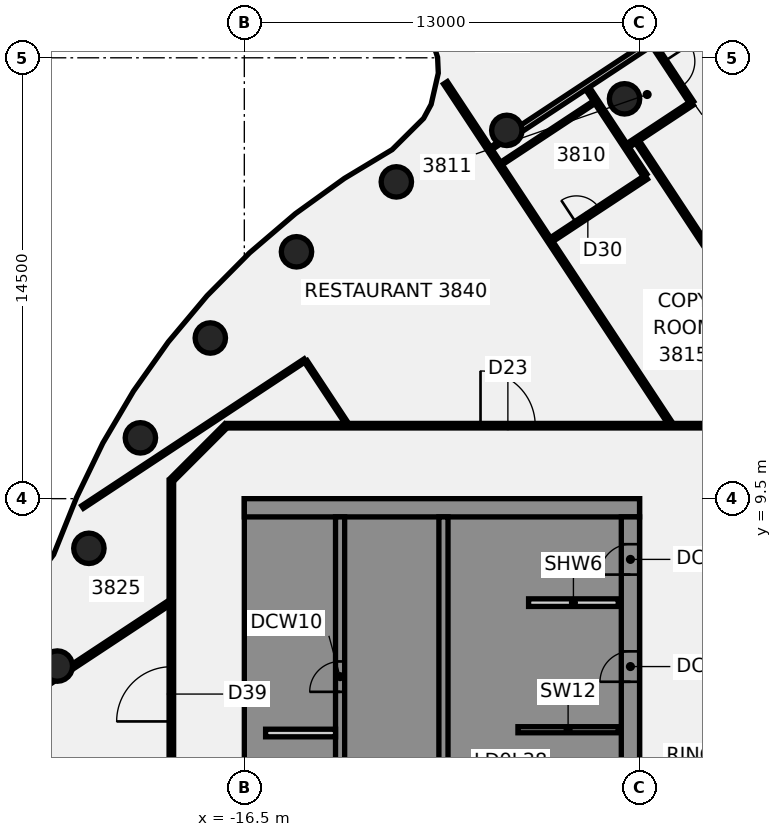
"""IFC4 building model, lengths in metres.
Left out: names, types, materials, properties, quantities, classifications, styles, units other than length and angle.
Written with IfcOpenShell. Run it as: python <this file> out.ifc"""

import sys

from ifc_helpers import new_model, si_unit, direction, frame, frame_2d, origin, origin_2d, place, context, subcontext, project, spatial, polyline, rectangle, circle, outline, extrude, element, fill, save


model = new_model("IFC4")
c1 = context("Model", 3, precision=1e-05, world=origin(), true_north=direction((0.0, 1.0)))
c2 = subcontext(c1, "Body", "Model", "MODEL_VIEW")
j1 = project(units=[si_unit("LENGTHUNIT", "METRE"), si_unit("PLANEANGLEUNIT", "RADIAN")], contexts=[c1])
p1 = place(None, origin())
s1 = spatial("IfcSite", under=j1, at=p1, CompositionType="ELEMENT")
p2 = place(p1, origin())
s2 = spatial("IfcBuilding", under=s1, at=p2, CompositionType="ELEMENT")
p3 = place(p2, frame((0.0, 0.0, 155.5)))
s3 = spatial("IfcBuildingStorey", under=s2, at=p3, CompositionType="ELEMENT", Elevation=155.5)
for number, where, z_axis, x_axis in (
    (1, (-3.994, 22.651, -0.14), (0.0, 0.0, 1.0), (1.0, 0.0, 0.0)),
    (2, (-7.866, 21.613, -0.14), (0.0, 0.0, 1.0), (1.0, 0.0, 0.0)),
    (3, (-11.5, 19.919, -0.14), (0.0, 0.0, 1.0), (1.0, 0.0, 0.0)),
    (4, (-14.784, 17.619, -0.14), (0.0, 0.0, 1.0), (1.0, 0.0, 0.0)),
    (5, (-17.619, 14.784, -0.14), (0.0, 0.0, 1.0), (1.0, 0.0, 0.0)),
    (6, (-19.919, 11.5, -0.14), (0.0, 0.0, 1.0), (1.0, 0.0, 0.0)),
    (7, (-21.613, 7.866, -0.14), (0.0, 0.0, 1.0), (1.0, 0.0, 0.0)),
    (8, (-22.651, 3.994, -0.14), (0.0, 0.0, 1.0), (1.0, 0.0, 0.0)),
):
    element("IfcColumn", number, at=place(p3, frame(where, z_axis=z_axis, x_axis=x_axis)), inside=s3, PredefinedType="COLUMN", context=c2, shape_type="SweptSolid", body=[
        extrude(circle(Radius=0.5, at=origin_2d()), origin(), (0.0, 0.0, 1.0), 3.75),
    ])
p4 = place(p3, frame((-28.862, 3.497, 0.0), z_axis=(0.0, 0.0, 1.0), x_axis=(0.551049471112, -0.834472576174, 0.0)))
e9 = element("IfcWall", 9, at=p4, inside=s3, PredefinedType="PARTITIONING", context=c2, shape_type="SweptSolid", body=[
    extrude(rectangle(XDim=13.029, YDim=0.2, at=frame_2d((6.514, 0.0))), origin(), (0.0, 0.0, 1.0), 3.01),
])
p5 = place(p4, frame((6.099, 0.0, 0.0)))
e10 = element("IfcOpeningElement", 10, at=p5, cuts=e9, PredefinedType="OPENING", context=c2, shape_type="SweptSolid", body=[
    extrude(rectangle(XDim=1.4, YDim=2.1, at=frame_2d((0.7, 1.05))), frame((0.0, 0.11, 0.0), z_axis=(0.0, -1.0, 0.0), x_axis=(1.0, 0.0, 0.0)), (0.0, 0.0, 1.0), 0.22),
])
p6 = place(p3, frame((-14.477, 14.014, 0.0), z_axis=(0.0, 0.0, 1.0), x_axis=(0.550874353815, -0.834588189653, 0.0)))
e11 = element("IfcWall", 11, at=p6, inside=s3, PredefinedType="PARTITIONING", context=c2, shape_type="SweptSolid", body=[
    extrude(rectangle(XDim=2.434, YDim=0.1, at=frame_2d((1.217, 0.0))), origin(), (0.0, 0.0, 1.0), 3.01),
])
p7 = place(p3, frame((-12.969, 39.464, 0.0), z_axis=(0.0, 0.0, 1.0), x_axis=(0.551034040248, -0.834482765842, 0.0)))
e12 = element("IfcWall", 12, at=p7, inside=s3, PredefinedType="PARTITIONING", context=c2, shape_type="SweptSolid", body=[
    extrude(rectangle(XDim=20.3, YDim=0.15, at=frame_2d((10.15, 0.0))), origin(), (0.0, 0.0, 1.0), 3.01),
])
p8 = place(p7, frame((18.67, 0.0, 0.0)))
e13 = element("IfcOpeningElement", 13, at=p8, cuts=e12, PredefinedType="OPENING", context=c2, shape_type="SweptSolid", body=[
    extrude(rectangle(XDim=1.0, YDim=2.1, at=frame_2d((0.5, 1.05))), frame((0.0, 0.085, 0.0), z_axis=(0.0, -1.0, 0.0), x_axis=(1.0, 0.0, 0.0)), (0.0, 0.0, 1.0), 0.17),
])
p9 = place(p7, frame((11.77, 0.0, 0.0)))
e14 = element("IfcOpeningElement", 14, at=p9, cuts=e12, PredefinedType="OPENING", context=c2, shape_type="SweptSolid", body=[
    extrude(rectangle(XDim=0.9, YDim=2.1, at=frame_2d((0.45, 1.05))), frame((0.0, 0.085, 0.0), z_axis=(0.0, -1.0, 0.0), x_axis=(1.0, 0.0, 0.0)), (0.0, 0.0, 1.0), 0.17),
])
p10 = place(p7, frame((5.17, 0.0, 0.0)))
e15 = element("IfcOpeningElement", 15, at=p10, cuts=e12, PredefinedType="OPENING", context=c2, shape_type="SweptSolid", body=[
    extrude(rectangle(XDim=0.9, YDim=2.1, at=frame_2d((0.45, 1.05))), frame((0.0, 0.085, 0.0), z_axis=(0.0, -1.0, 0.0), x_axis=(1.0, 0.0, 0.0)), (0.0, 0.0, 1.0), 0.17),
])
p11 = place(p3, frame((-9.884, 23.177, 0.0), z_axis=(0.0, 0.0, 1.0), x_axis=(0.550963337995, -0.834529448363, 0.0)))
e16 = element("IfcWall", 16, at=p11, inside=s3, PredefinedType="PARTITIONING", context=c2, shape_type="SweptSolid", body=[
    extrude(rectangle(XDim=13.393, YDim=0.15, at=frame_2d((6.697, 0.0))), origin(), (0.0, 0.0, 1.0), 3.01),
])
p12 = place(p3, frame((-5.21, 22.995, 0.0), z_axis=(0.0, 0.0, 1.0), x_axis=(0.550928577868, -0.834552396251, 0.0)))
e17 = element("IfcWall", 17, at=p12, inside=s3, PredefinedType="PARTITIONING", context=c2, shape_type="SweptSolid", body=[
    extrude(rectangle(XDim=3.426, YDim=0.15, at=frame_2d((1.713, 0.0))), origin(), (0.0, 0.0, 1.0), 3.01),
])
p13 = place(p3, frame((-3.565, 21.228, 0.0), z_axis=(0.0, 0.0, 1.0), x_axis=(0.55097538213, -0.834521496599, 0.0)))
e18 = element("IfcWall", 18, at=p13, inside=s3, PredefinedType="PARTITIONING", context=c2, shape_type="SweptSolid", body=[
    extrude(rectangle(XDim=11.058, YDim=0.15, at=frame_2d((5.529, 0.0))), origin(), (0.0, 0.0, 1.0), 3.01),
])
p14 = place(p13, frame((6.67, 0.0, 0.0)))
e19 = element("IfcOpeningElement", 19, at=p14, cuts=e18, PredefinedType="OPENING", context=c2, shape_type="SweptSolid", body=[
    extrude(rectangle(XDim=0.9, YDim=2.1, at=frame_2d((0.45, 1.05))), frame((0.0, 0.085, 0.0), z_axis=(0.0, -1.0, 0.0), x_axis=(1.0, 0.0, 0.0)), (0.0, 0.0, 1.0), 0.17),
])
p15 = place(p3, frame((-17.065, 11.9, 0.0), z_axis=(0.0, 0.0, 1.0), x_axis=(1.0, 0.0, 0.0)))
e20 = element("IfcWall", 20, at=p15, inside=s3, PredefinedType="PARTITIONING", context=c2, shape_type="SweptSolid", body=[
    extrude(rectangle(XDim=34.165, YDim=0.15, at=frame_2d((17.083, 0.0))), origin(), (0.0, 0.0, 1.0), 3.01),
])
p16 = place(p15, frame((22.509, 0.0, 0.0)))
e21 = element("IfcOpeningElement", 21, at=p16, cuts=e20, PredefinedType="OPENING", context=c2, shape_type="SweptSolid", body=[
    extrude(rectangle(XDim=1.8, YDim=2.1, at=frame_2d((0.9, 1.05))), frame((0.0, 0.085, 0.0), z_axis=(0.0, -1.0, 0.0), x_axis=(1.0, 0.0, 0.0)), (0.0, 0.0, 1.0), 0.17),
])
p17 = place(p15, frame((30.477, 0.0, 0.0)))
e22 = element("IfcOpeningElement", 22, at=p17, cuts=e20, PredefinedType="OPENING", context=c2, shape_type="SweptSolid", body=[
    extrude(rectangle(XDim=1.8, YDim=2.1, at=frame_2d((0.9, 1.05))), frame((0.0, 0.085, 0.0), z_axis=(0.0, -1.0, 0.0), x_axis=(1.0, 0.0, 0.0)), (0.0, 0.0, 1.0), 0.17),
])
p18 = place(p15, frame((8.334, 0.0, 0.0)))
e23 = element("IfcOpeningElement", 23, at=p18, cuts=e20, PredefinedType="OPENING", context=c2, shape_type="SweptSolid", body=[
    extrude(rectangle(XDim=1.8, YDim=2.1, at=frame_2d((0.9, 1.05))), frame((0.0, 0.085, 0.0), z_axis=(0.0, -1.0, 0.0), x_axis=(1.0, 0.0, 0.0)), (0.0, 0.0, 1.0), 0.17),
])
p19 = place(p3, frame((-26.96, 0.799, 0.0), z_axis=(0.0, 0.0, 1.0), x_axis=(0.834519729805, 0.550978058152, 0.0)))
e24 = element("IfcWall", 24, at=p19, inside=s3, PredefinedType="PARTITIONING", context=c2, shape_type="SweptSolid", body=[
    extrude(rectangle(XDim=4.957, YDim=0.15, at=frame_2d((2.479, 0.0))), origin(), (0.0, 0.0, 1.0), 3.01),
])
p20 = place(p19, frame((2.6, 0.0, 0.0)))
e25 = element("IfcOpeningElement", 25, at=p20, cuts=e24, PredefinedType="OPENING", context=c2, shape_type="SweptSolid", body=[
    extrude(rectangle(XDim=0.9, YDim=2.1, at=frame_2d((0.45, 1.05))), frame((0.0, 0.085, 0.0), z_axis=(0.0, -1.0, 0.0), x_axis=(1.0, 0.0, 0.0)), (0.0, 0.0, 1.0), 0.17),
])
p21 = place(p3, frame((-22.145, 3.979, 0.0), z_axis=(0.0, 0.0, 1.0), x_axis=(0.834514075332, 0.550986622409, 0.0)))
e26 = element("IfcWall", 26, at=p21, inside=s3, PredefinedType="PARTITIONING", context=c2, shape_type="SweptSolid", body=[
    extrude(rectangle(XDim=3.768, YDim=0.15, at=frame_2d((1.884, 0.0))), origin(), (0.0, 0.0, 1.0), 3.01),
])
p22 = place(p3, frame((-21.82, 9.226, 0.0), z_axis=(0.0, 0.0, 1.0), x_axis=(0.83453104674, 0.550960916969, 0.0)))
e27 = element("IfcWall", 27, at=p22, inside=s3, PredefinedType="PARTITIONING", context=c2, shape_type="SweptSolid", body=[
    extrude(rectangle(XDim=8.767, YDim=0.1, at=frame_2d((4.384, 0.0))), origin(), (0.0, 0.0, 1.0), 3.01),
])
p23 = place(p3, frame((-8.042, 20.524, 0.0), z_axis=(0.0, 0.0, 1.0), x_axis=(0.834491304173, 0.551021109632, 0.0)))
e28 = element("IfcWall", 28, at=p23, inside=s3, PredefinedType="PARTITIONING", context=c2, shape_type="SweptSolid", body=[
    extrude(rectangle(XDim=3.65, YDim=0.1, at=frame_2d((1.825, 0.0))), origin(), (0.0, 0.0, 1.0), 3.01),
])
p24 = place(p3, frame((-6.386, 18.024, 0.0), z_axis=(0.0, 0.0, 1.0), x_axis=(0.83468603123, 0.550726092781, 0.0)))
e29 = element("IfcWall", 29, at=p24, inside=s3, PredefinedType="PARTITIONING", context=c2, shape_type="SweptSolid", body=[
    extrude(rectangle(XDim=3.72, YDim=0.15, at=frame_2d((1.86, 0.0))), origin(), (0.0, 0.0, 1.0), 3.01),
])
p25 = place(p24, frame((0.97, 0.0, 0.0)))
e30 = element("IfcOpeningElement", 30, at=p25, cuts=e29, PredefinedType="OPENING", context=c2, shape_type="SweptSolid", body=[
    extrude(rectangle(XDim=0.9, YDim=2.1, at=frame_2d((0.45, 1.05))), frame((0.0, 0.085, 0.0), z_axis=(0.0, -1.0, 0.0), x_axis=(1.0, 0.0, 0.0)), (0.0, 0.0, 1.0), 0.17),
])
p26 = place(p3, frame((-8.374, 21.026, 0.0), z_axis=(0.0, 0.0, 1.0), x_axis=(0.834587667003, 0.550875145642, 0.0)))
e31 = element("IfcWall", 31, at=p26, inside=s3, PredefinedType="PARTITIONING", context=c2, shape_type="SweptSolid", body=[
    extrude(rectangle(XDim=0.516, YDim=0.1, at=frame_2d((0.258, 0.0))), origin(), (0.0, 0.0, 1.0), 3.01),
])
p27 = place(p3, frame((-7.567, 21.559, 0.0), z_axis=(0.0, 0.0, 1.0), x_axis=(0.834644793963, 0.55078858731, 0.0)))
e32 = element("IfcWall", 32, at=p27, inside=s3, PredefinedType="PARTITIONING", context=c2, shape_type="SweptSolid", body=[
    extrude(rectangle(XDim=13.257, YDim=0.2, at=frame_2d((6.629, 0.0))), origin(), (0.0, 0.0, 1.0), 3.01),
])
p28 = place(p27, frame((5.658, 0.0, 0.0)))
e33 = element("IfcOpeningElement", 33, at=p28, cuts=e32, PredefinedType="OPENING", context=c2, shape_type="SweptSolid", body=[
    extrude(rectangle(XDim=1.4, YDim=2.1, at=frame_2d((0.7, 1.05))), frame((0.0, 0.11, 0.0), z_axis=(0.0, -1.0, 0.0), x_axis=(1.0, 0.0, 0.0)), (0.0, 0.0, 1.0), 0.22),
])
p29 = place(p3, frame((-3.875, 21.119, 0.0), z_axis=(0.0, 0.0, 1.0), x_axis=(0.834339300492, 0.551251241863, 0.0)))
e34 = element("IfcWall", 34, at=p29, inside=s3, PredefinedType="PARTITIONING", context=c2, shape_type="SweptSolid", body=[
    extrude(rectangle(XDim=2.519, YDim=0.15, at=frame_2d((1.26, 0.0))), origin(), (0.0, 0.0, 1.0), 3.01),
])
p30 = place(p3, frame((-18.872, 10.128, 0.0), z_axis=(0.0, 0.0, 1.0), x_axis=(0.707106781187, 0.707106781187, 0.0)))
e35 = element("IfcWall", 35, at=p30, inside=s3, PredefinedType="PARTITIONING", context=c2, shape_type="SweptSolid", body=[
    extrude(rectangle(XDim=2.505, YDim=0.15, at=frame_2d((1.253, 0.0))), origin(), (0.0, 0.0, 1.0), 3.01),
])
p31 = place(p3, frame((-18.9, -10.1, 0.0), z_axis=(0.0, 0.0, 1.0), x_axis=(0.0, 1.0, 0.0)))
e36 = element("IfcWall", 36, at=p31, inside=s3, PredefinedType="PARTITIONING", context=c2, shape_type="SweptSolid", body=[
    extrude(rectangle(XDim=20.2, YDim=0.15, at=frame_2d((10.1, 0.0))), origin(), (0.0, 0.0, 1.0), 3.01),
])
p32 = place(p31, frame((12.273, 0.0, 0.0)))
e37 = element("IfcOpeningElement", 37, at=p32, cuts=e36, PredefinedType="OPENING", context=c2, shape_type="SweptSolid", body=[
    extrude(rectangle(XDim=1.8, YDim=2.1, at=frame_2d((0.9, 1.05))), frame((0.0, 0.085, 0.0), z_axis=(0.0, -1.0, 0.0), x_axis=(1.0, 0.0, 0.0)), (0.0, 0.0, 1.0), 0.17),
])
p33 = place(p31, frame((4.54, 0.0, 0.0)))
e38 = element("IfcOpeningElement", 38, at=p33, cuts=e36, PredefinedType="OPENING", context=c2, shape_type="SweptSolid", body=[
    extrude(rectangle(XDim=0.9, YDim=2.1, at=frame_2d((0.45, 1.05))), frame((0.0, 0.085, 0.0), z_axis=(0.0, -1.0, 0.0), x_axis=(1.0, 0.0, 0.0)), (0.0, 0.0, 1.0), 0.17),
])
p34 = place(p3, origin())
e39 = element("IfcWall", 39, at=p34, inside=s3, PredefinedType="SHEAR", context=c2, shape_type="SweptSolid", body=[
    extrude(outline(polyline([(-13.5, -8.125), (-15.9, -8.125), (-15.9, -5.625), (-13.5, -5.625), (-13.5, -5.375), (-15.9, -5.375), (-15.9, 5.375), (-13.5, 5.375), (-13.5, 5.625), (-15.9, 5.625), (-15.9, 8.125), (-13.5, 8.125), (-13.5, 8.9), (-15.9, 8.9), (-16.5, 8.9), (-16.5, -8.9), (-15.9, -8.9), (-13.5, -8.9), (-13.5, -8.125)])), origin(), (0.0, 0.0, 1.0), 3.61),
])
p35 = place(p3, frame((-16.5, 9.2, 0.0), z_axis=(0.0, 0.0, 1.0), x_axis=(1.0, 0.0, 0.0)))
e40 = element("IfcWall", 40, at=p35, inside=s3, PredefinedType="SHEAR", context=c2, shape_type="SweptSolid", body=[
    extrude(rectangle(XDim=13.0, YDim=0.6, at=frame_2d((6.5, 0.0))), origin(), (0.0, 0.0, 1.0), 3.61),
])
p36 = place(p3, origin())
e41 = element("IfcWall", 41, at=p36, inside=s3, PredefinedType="SHEAR", context=c2, shape_type="SweptSolid", body=[
    extrude(outline(polyline([(-9.8, -5.375), (-9.8, -5.625), (-7.5, -5.625), (-7.2, -5.625), (-7.2, 8.9), (-7.5, 8.9), (-9.8, 8.9), (-9.8, 8.125), (-7.5, 8.125), (-7.5, 5.625), (-9.8, 5.625), (-9.8, 5.375), (-7.5, 5.375), (-7.5, 2.875), (-9.8, 2.875), (-9.8, 2.625), (-7.5, 2.625), (-7.5, 0.125), (-9.8, 0.125), (-9.8, -0.125), (-7.5, -0.125), (-7.5, -2.625), (-9.8, -2.625), (-9.8, -2.875), (-7.5, -2.875), (-7.5, -5.375), (-9.8, -5.375)])), origin(), (0.0, 0.0, 1.0), 3.61),
])
p37 = place(p3, frame((-7.5, 1.9, 0.0), z_axis=(0.0, 0.0, 1.0), x_axis=(1.0, 0.0, 0.0)))
e42 = element("IfcWall", 42, at=p37, inside=s3, PredefinedType="SHEAR", context=c2, shape_type="SweptSolid", body=[
    extrude(rectangle(XDim=3.3, YDim=0.2, at=frame_2d((1.65, 0.0))), origin(), (0.0, 0.0, 1.0), 3.61),
])
p38 = place(p3, frame((-13.35, -8.9, 0.0), z_axis=(0.0, 0.0, 1.0), x_axis=(0.0, 1.0, 0.0)))
e43 = element("IfcWall", 43, at=p38, inside=s3, PredefinedType="SHEAR", context=c2, shape_type="SweptSolid", body=[
    extrude(rectangle(XDim=17.8, YDim=0.3, at=frame_2d((8.9, 0.0))), origin(), (0.0, 0.0, 1.0), 3.61),
])
p39 = place(p38, frame((1.325, 0.0, 0.0)))
e44 = element("IfcOpeningElement", 44, at=p39, cuts=e43, PredefinedType="OPENING", context=c2, shape_type="SweptSolid", body=[
    extrude(rectangle(XDim=1.4, YDim=2.1, at=frame_2d((0.7, 1.05))), frame((0.0, 0.16, 0.0), z_axis=(0.0, -1.0, 0.0), x_axis=(1.0, 0.0, 0.0)), (0.0, 0.0, 1.0), 0.32),
])
p40 = place(p38, frame((6.546, 0.0, 0.0)))
e45 = element("IfcOpeningElement", 45, at=p40, cuts=e43, PredefinedType="OPENING", context=c2, shape_type="SweptSolid", body=[
    extrude(rectangle(XDim=1.0, YDim=2.1, at=frame_2d((0.5, 1.05))), frame((0.0, 0.16, 0.0), z_axis=(0.0, -1.0, 0.0), x_axis=(1.0, 0.0, 0.0)), (0.0, 0.0, 1.0), 0.32),
])
p41 = place(p38, frame((12.046, 0.0, 0.0)))
e46 = element("IfcOpeningElement", 46, at=p41, cuts=e43, PredefinedType="OPENING", context=c2, shape_type="SweptSolid", body=[
    extrude(rectangle(XDim=1.0, YDim=2.1, at=frame_2d((0.5, 1.05))), frame((0.0, 0.16, 0.0), z_axis=(0.0, -1.0, 0.0), x_axis=(1.0, 0.0, 0.0)), (0.0, 0.0, 1.0), 0.32),
])
p42 = place(p3, frame((-9.95, -8.9, 0.0), z_axis=(0.0, 0.0, 1.0), x_axis=(0.0, 1.0, 0.0)))
e47 = element("IfcWall", 47, at=p42, inside=s3, PredefinedType="SHEAR", context=c2, shape_type="SweptSolid", body=[
    extrude(rectangle(XDim=17.8, YDim=0.3, at=frame_2d((8.9, 0.0))), origin(), (0.0, 0.0, 1.0), 3.61),
])
p43 = place(p42, frame((4.175, 0.0, 0.0)))
e48 = element("IfcOpeningElement", 48, at=p43, cuts=e47, PredefinedType="OPENING", context=c2, shape_type="SweptSolid", body=[
    extrude(rectangle(XDim=1.2, YDim=2.1, at=frame_2d((0.6, 1.05))), frame((0.0, 0.16, 0.0), z_axis=(0.0, -1.0, 0.0), x_axis=(1.0, 0.0, 0.0)), (0.0, 0.0, 1.0), 0.32),
])
p44 = place(p42, frame((6.925, 0.0, 0.0)))
e49 = element("IfcOpeningElement", 49, at=p44, cuts=e47, PredefinedType="OPENING", context=c2, shape_type="SweptSolid", body=[
    extrude(rectangle(XDim=1.2, YDim=2.1, at=frame_2d((0.6, 1.05))), frame((0.0, 0.16, 0.0), z_axis=(0.0, -1.0, 0.0), x_axis=(1.0, 0.0, 0.0)), (0.0, 0.0, 1.0), 0.32),
])
p45 = place(p3, frame((-3.8, -8.9, 0.0), z_axis=(0.0, 0.0, 1.0), x_axis=(0.0, 1.0, 0.0)))
e50 = element("IfcWall", 50, at=p45, inside=s3, PredefinedType="SHEAR", context=c2, shape_type="SweptSolid", body=[
    extrude(rectangle(XDim=17.8, YDim=0.6, at=frame_2d((8.9, 0.0))), origin(), (0.0, 0.0, 1.0), 3.61),
])
p46 = place(p45, frame((1.25, 0.0, 0.0)))
e51 = element("IfcOpeningElement", 51, at=p46, cuts=e50, PredefinedType="OPENING", context=c2, shape_type="SweptSolid", body=[
    extrude(rectangle(XDim=1.8, YDim=2.1, at=frame_2d((0.9, 1.05))), frame((0.0, 0.31, 0.0), z_axis=(0.0, -1.0, 0.0), x_axis=(1.0, 0.0, 0.0)), (0.0, 0.0, 1.0), 0.62),
])
p47 = place(p45, frame((12.377, 0.0, 0.0)))
e52 = element("IfcOpeningElement", 52, at=p47, cuts=e50, PredefinedType="OPENING", context=c2, shape_type="SweptSolid", body=[
    extrude(rectangle(XDim=1.0, YDim=2.1, at=frame_2d((0.5, 1.05))), frame((0.0, 0.31, 0.0), z_axis=(0.0, -1.0, 0.0), x_axis=(1.0, 0.0, 0.0)), (0.0, 0.0, 1.0), 0.62),
])
p48 = place(p45, frame((15.903, 0.0, 0.0)))
e53 = element("IfcOpeningElement", 53, at=p48, cuts=e50, PredefinedType="OPENING", context=c2, shape_type="SweptSolid", body=[
    extrude(rectangle(XDim=1.0, YDim=2.1, at=frame_2d((0.5, 1.05))), frame((0.0, 0.31, 0.0), z_axis=(0.0, -1.0, 0.0), x_axis=(1.0, 0.0, 0.0)), (0.0, 0.0, 1.0), 0.62),
])
p49 = place(p3, frame((-7.15, 6.08, 0.0), z_axis=(0.0, 0.0, 1.0), x_axis=(1.0, 0.0, 0.0)))
e54 = element("IfcWall", 54, at=p49, inside=s3, PredefinedType="PARTITIONING", context=c2, shape_type="SweptSolid", body=[
    extrude(rectangle(XDim=2.95, YDim=0.25, at=frame_2d((1.475, 0.0))), origin(), (0.0, 0.0, 1.0), 3.61),
])
p50 = place(p3, frame((-15.8, 1.792, 0.0), z_axis=(0.0, 0.0, 1.0), x_axis=(1.0, 0.0, 0.0)))
e55 = element("IfcWall", 55, at=p50, inside=s3, PredefinedType="PARTITIONING", context=c2, shape_type="SweptSolid", body=[
    extrude(rectangle(XDim=2.3, YDim=0.25, at=frame_2d((1.15, 0.0))), origin(), (0.0, 0.0, 1.0), 3.61),
])
p51 = place(p8, frame((1.0, 0.0, 0.0), z_axis=(0.0, 0.0, 1.0), x_axis=(-1.0, 0.0, 0.0)))
e56 = element("IfcDoor", 56, at=p51, inside=s3, OperationType="SINGLE_SWING_RIGHT", PredefinedType="DOOR", context=c2, shape_type="SweptSolid", body=[
    extrude(rectangle(XDim=1.0, YDim=2.1, at=frame_2d((0.5, 1.05))), frame((0.0, 0.025, 0.0), z_axis=(0.0, -1.0, 0.0), x_axis=(1.0, 0.0, 0.0)), (0.0, 0.0, 1.0), 0.05),
])
fill(e13, e56)
p52 = place(p18, frame((1.8, 0.0, 0.0), z_axis=(0.0, 0.0, 1.0), x_axis=(-1.0, 0.0, 0.0)))
e57 = element("IfcDoor", 57, at=p52, inside=s3, OperationType="DOUBLE_DOOR_SINGLE_SWING", PredefinedType="DOOR", context=c2, shape_type="SweptSolid", body=[
    extrude(rectangle(XDim=1.8, YDim=2.1, at=frame_2d((0.9, 1.05))), frame((0.0, 0.025, 0.0), z_axis=(0.0, -1.0, 0.0), x_axis=(1.0, 0.0, 0.0)), (0.0, 0.0, 1.0), 0.05),
])
fill(e23, e57)
p53 = place(p25, origin())
e58 = element("IfcDoor", 58, at=p53, inside=s3, OperationType="SINGLE_SWING_RIGHT", PredefinedType="DOOR", context=c2, shape_type="SweptSolid", body=[
    extrude(rectangle(XDim=0.9, YDim=2.1, at=frame_2d((0.45, 1.05))), frame((0.0, 0.025, 0.0), z_axis=(0.0, -1.0, 0.0), x_axis=(1.0, 0.0, 0.0)), (0.0, 0.0, 1.0), 0.05),
])
fill(e30, e58)
p54 = place(p32, frame((1.8, 0.0, 0.0), z_axis=(0.0, 0.0, 1.0), x_axis=(-1.0, 0.0, 0.0)))
e59 = element("IfcDoor", 59, at=p54, inside=s3, OperationType="DOUBLE_DOOR_SINGLE_SWING", PredefinedType="DOOR", context=c2, shape_type="SweptSolid", body=[
    extrude(rectangle(XDim=1.8, YDim=2.1, at=frame_2d((0.9, 1.05))), frame((0.0, 0.025, 0.0), z_axis=(0.0, -1.0, 0.0), x_axis=(1.0, 0.0, 0.0)), (0.0, 0.0, 1.0), 0.05),
])
fill(e37, e59)
p55 = place(p47, origin())
e60 = element("IfcDoor", 60, at=p55, inside=s3, OperationType="SINGLE_SWING_LEFT", PredefinedType="DOOR", context=c2, shape_type="SweptSolid", body=[
    extrude(rectangle(XDim=1.0, YDim=2.1, at=frame_2d((0.5, 1.05))), frame((0.0, 0.275, 0.0), z_axis=(0.0, -1.0, 0.0), x_axis=(1.0, 0.0, 0.0)), (0.0, 0.0, 1.0), 0.05),
])
fill(e52, e60)
p56 = place(p48, origin())
e61 = element("IfcDoor", 61, at=p56, inside=s3, OperationType="SINGLE_SWING_LEFT", PredefinedType="DOOR", context=c2, shape_type="SweptSolid", body=[
    extrude(rectangle(XDim=1.0, YDim=2.1, at=frame_2d((0.5, 1.05))), frame((0.0, 0.275, 0.0), z_axis=(0.0, -1.0, 0.0), x_axis=(1.0, 0.0, 0.0)), (0.0, 0.0, 1.0), 0.05),
])
fill(e53, e61)
p57 = place(p41, origin())
e62 = element("IfcDoor", 62, at=p57, inside=s3, OperationType="SINGLE_SWING_LEFT", PredefinedType="DOOR", context=c2, shape_type="SweptSolid", body=[
    extrude(rectangle(XDim=1.0, YDim=2.1, at=frame_2d((0.5, 1.05))), frame((0.0, 0.025, 0.0), z_axis=(0.0, -1.0, 0.0), x_axis=(1.0, 0.0, 0.0)), (0.0, 0.0, 1.0), 0.05),
])
fill(e46, e62)
save(model, sys.argv[1])
